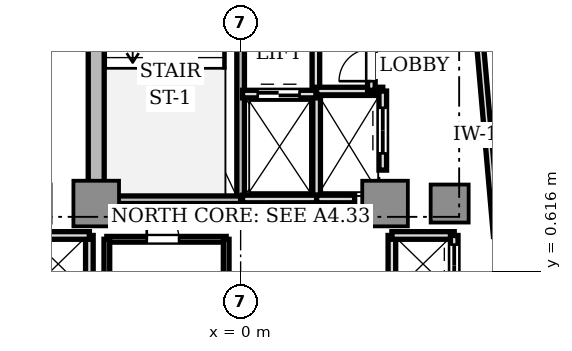
"""IFC4 building model, lengths in metres.
Left out: names, types, materials, properties, quantities, classifications, styles, units other than length and angle.
Written with IfcOpenShell. Run it as: python <this file> out.ifc"""

import sys

from ifc_helpers import new_model, si_unit, direction, frame, frame_2d, origin, origin_2d, place, context, subcontext, project, spatial, rectangle, extrude, source, transform, mapped, element, fill, save


model = new_model("IFC4")
c1 = context("Model", 3, precision=1e-05, world=origin(), true_north=direction((0.0, 1.0)))
c2 = subcontext(c1, "Body", "Model", "MODEL_VIEW")
j1 = project(units=[si_unit("LENGTHUNIT", "METRE"), si_unit("PLANEANGLEUNIT", "RADIAN")], contexts=[c1])
p1 = place(None, origin())
s1 = spatial("IfcSite", under=j1, at=p1, CompositionType="ELEMENT")
p2 = place(p1, origin())
s2 = spatial("IfcBuilding", under=s1, at=p2, CompositionType="ELEMENT")
p3 = place(p2, frame((0.0, 0.0, 191.95)))
s3 = spatial("IfcBuildingStorey", under=s2, at=p3, CompositionType="ELEMENT", Elevation=191.95)
p4 = place(p3, frame((-3.8, 2.85, 0.0), z_axis=(0.0, 0.0, 1.0), x_axis=(0.0, 1.0, 0.0)))
e1 = element("IfcWall", 1, at=p4, inside=s3, PredefinedType="SHEAR", context=c2, shape_type="SweptSolid", body=[
    extrude(rectangle(XDim=6.9, YDim=0.42, at=frame_2d((3.45, 0.0))), origin(), (0.0, 0.0, 1.0), 3.11),
])
m1 = source(origin(), c2, "Body", "SweptSolid", [
    extrude(rectangle(XDim=1.2, YDim=1.2, at=origin_2d()), origin(), (0.0, 0.0, 1.0), 3.11),
])
for number, where, z_axis, x_axis in (
    (2, (-3.8, 2.4, 0.0), (0.0, 0.0, 1.0), (1.0, 0.0, 0.0)),
    (3, (3.8, 2.4, 0.0), (0.0, 0.0, 1.0), (1.0, 0.0, 0.0)),
):
    element("IfcColumn", number, at=place(p3, frame(where, z_axis=z_axis, x_axis=x_axis)), inside=s3, PredefinedType="COLUMN", context=c2, shape_type="MappedRepresentation", body=[
        mapped(m1, transform((0.0, 0.0, 0.0), scale=1.0)),
    ])
m2 = source(origin(), c2, "Body", "SweptSolid", [
    extrude(rectangle(XDim=1.0, YDim=1.0, at=origin_2d()), origin(), (0.0, 0.0, 1.0), 3.11),
])
p5 = place(p3, frame((5.5, 2.4, 0.0), z_axis=(0.0, 0.0, 1.0), x_axis=(1.0, 0.0, 0.0)))
e4 = element("IfcColumn", 4, at=p5, inside=s3, PredefinedType="COLUMN", context=c2, shape_type="MappedRepresentation", body=[
    mapped(m2, transform((0.0, 0.0, 0.0), scale=1.0)),
])
p6 = place(p3, frame((0.0, 2.5, 0.0), z_axis=(0.0, 0.0, 1.0), x_axis=(0.0, 1.0, 0.0)))
e5 = element("IfcWall", 5, at=p6, inside=s3, PredefinedType="SOLIDWALL", context=c2, shape_type="SweptSolid", body=[
    extrude(rectangle(XDim=7.68, YDim=0.2, at=frame_2d((3.84, 0.0))), origin(), (0.0, 0.0, 1.0), 3.11),
])
p7 = place(p6, frame((6.36, 0.0, 0.0)))
e6 = element("IfcOpeningElement", 6, at=p7, cuts=e5, PredefinedType="OPENING", context=c2, shape_type="SweptSolid", body=[
    extrude(rectangle(XDim=1.1, YDim=2.15, at=frame_2d((0.55, 1.075))), frame((0.0, 0.11, 0.0), z_axis=(0.0, -1.0, 0.0), x_axis=(1.0, 0.0, 0.0)), (0.0, 0.0, 1.0), 0.22),
])
p8 = place(p3, frame((-3.72, 2.5, 0.0), z_axis=(0.0, 0.0, 1.0), x_axis=(1.0, 0.0, 0.0)))
e7 = element("IfcWall", 7, at=p8, inside=s3, PredefinedType="SOLIDWALL", context=c2, shape_type="SweptSolid", body=[
    extrude(rectangle(XDim=3.72, YDim=0.2, at=frame_2d((1.86, 0.0))), origin(), (0.0, 0.0, 1.0), 3.11),
])
p9 = place(p3, frame((1.98, 5.32, 0.0), z_axis=(0.0, 0.0, 1.0), x_axis=(0.0, 1.0, 0.0)))
e8 = element("IfcWall", 8, at=p9, inside=s3, PredefinedType="SOLIDWALL", context=c2, shape_type="SweptSolid", body=[
    extrude(rectangle(XDim=4.66, YDim=0.2, at=frame_2d((2.33, 0.0))), origin(), (0.0, 0.0, 1.0), 2.66),
])
p10 = place(p9, frame((3.04, 0.0, 0.0)))
e9 = element("IfcOpeningElement", 9, at=p10, cuts=e8, PredefinedType="OPENING", context=c2, shape_type="SweptSolid", body=[
    extrude(rectangle(XDim=0.85, YDim=2.1, at=frame_2d((0.425, 1.05))), frame((0.0, 0.11, 0.0), z_axis=(0.0, -1.0, 0.0), x_axis=(1.0, 0.0, 0.0)), (0.0, 0.0, 1.0), 0.22),
])
p11 = place(p3, frame((2.0, 2.5, 0.0), z_axis=(0.0, 0.0, 1.0), x_axis=(0.0, 1.0, 0.0)))
e10 = element("IfcWall", 10, at=p11, inside=s3, PredefinedType="SOLIDWALL", context=c2, shape_type="SweptSolid", body=[
    extrude(rectangle(XDim=2.78, YDim=0.2, at=frame_2d((1.39, 0.0))), origin(), (0.0, 0.0, 1.0), 2.66),
])
p12 = place(p3, frame((0.05, 2.52, 0.0), z_axis=(0.0, 0.0, 1.0), x_axis=(1.0, 0.0, 0.0)))
e11 = element("IfcWall", 11, at=p12, inside=s3, PredefinedType="SOLIDWALL", context=c2, shape_type="SweptSolid", body=[
    extrude(rectangle(XDim=1.95, YDim=0.2, at=frame_2d((0.975, 0.0))), origin(), (0.0, 0.0, 1.0), 2.66),
])
p13 = place(p3, frame((0.05, 5.28, 0.0), z_axis=(0.0, 0.0, 1.0), x_axis=(1.0, 0.0, 0.0)))
e12 = element("IfcWall", 12, at=p13, inside=s3, PredefinedType="SOLIDWALL", context=c2, shape_type="SweptSolid", body=[
    extrude(rectangle(XDim=1.93, YDim=0.2, at=frame_2d((0.965, 0.0))), origin(), (0.0, 0.0, 1.0), 2.66),
])
p14 = place(p13, frame((0.4, 0.0, 0.0)))
e13 = element("IfcOpeningElement", 13, at=p14, cuts=e12, PredefinedType="OPENING", context=c2, shape_type="SweptSolid", body=[
    extrude(rectangle(XDim=1.1, YDim=2.2, at=frame_2d((0.55, 1.1))), frame((0.0, 0.11, 0.0), z_axis=(0.0, -1.0, 0.0), x_axis=(1.0, 0.0, 0.0)), (0.0, 0.0, 1.0), 0.22),
])
p15 = place(p3, frame((2.0, 2.52, 0.0), z_axis=(0.0, 0.0, 1.0), x_axis=(1.0, 0.0, 0.0)))
e14 = element("IfcWall", 14, at=p15, inside=s3, PredefinedType="SOLIDWALL", context=c2, shape_type="SweptSolid", body=[
    extrude(rectangle(XDim=1.0, YDim=0.2, at=frame_2d((0.5, 0.0))), origin(), (0.0, 0.0, 1.0), 2.66),
])
p16 = place(p3, frame((2.0, 5.36, 0.0), z_axis=(0.0, 0.0, 1.0), x_axis=(1.0, 0.0, 0.0)))
e15 = element("IfcWall", 15, at=p16, inside=s3, PredefinedType="SOLIDWALL", context=c2, shape_type="SweptSolid", body=[
    extrude(rectangle(XDim=1.74, YDim=0.2, at=frame_2d((0.87, 0.0))), origin(), (0.0, 0.0, 1.0), 2.66),
])
p17 = place(p3, frame((3.74, 3.28, 0.0), z_axis=(0.0, 0.0, 1.0), x_axis=(0.0, 1.0, 0.0)))
e16 = element("IfcWall", 16, at=p17, inside=s3, PredefinedType="SOLIDWALL", context=c2, shape_type="SweptSolid", body=[
    extrude(rectangle(XDim=2.08, YDim=0.2, at=frame_2d((1.04, 0.0))), origin(), (0.0, 0.0, 1.0), 2.66),
])
p18 = place(p17, frame((0.44, 0.0, 0.0)))
e17 = element("IfcOpeningElement", 17, at=p18, cuts=e16, PredefinedType="OPENING", context=c2, shape_type="SweptSolid", body=[
    extrude(rectangle(XDim=1.2, YDim=2.2, at=frame_2d((0.6, 1.1))), frame((0.0, 0.11, 0.0), z_axis=(0.0, -1.0, 0.0), x_axis=(1.0, 0.0, 0.0)), (0.0, 0.0, 1.0), 0.22),
])
p19 = place(p3, frame((3.98, -1.56, 0.0), z_axis=(0.0, 0.0, 1.0), x_axis=(0.0, 1.0, 0.0)))
e18 = element("IfcWall", 18, at=p19, inside=s3, PredefinedType="SOLIDWALL", context=c2, shape_type="SweptSolid", body=[
    extrude(rectangle(XDim=3.12, YDim=0.2, at=frame_2d((1.56, 0.0))), origin(), (0.0, 0.0, 1.0), 2.28),
])
p20 = place(p3, frame((3.98, 1.56, 0.0), z_axis=(0.0, 0.0, 1.0), x_axis=(1.0, 0.0, 0.0)))
e19 = element("IfcWall", 19, at=p20, inside=s3, PredefinedType="SOLIDWALL", context=c2, shape_type="SweptSolid", body=[
    extrude(rectangle(XDim=1.64, YDim=0.2, at=frame_2d((0.82, 0.0))), origin(), (0.0, 0.0, 1.0), 2.66),
])
p21 = place(p3, frame((5.62, 0.0, 0.0), z_axis=(0.0, 0.0, 1.0), x_axis=(0.0, 1.0, 0.0)))
e20 = element("IfcWall", 20, at=p21, inside=s3, PredefinedType="SOLIDWALL", context=c2, shape_type="SweptSolid", body=[
    extrude(rectangle(XDim=1.56, YDim=0.2, at=frame_2d((0.78, 0.0))), origin(), (0.0, 0.0, 1.0), 2.66),
])
p22 = place(p21, frame((0.22, 0.0, 0.0)))
e21 = element("IfcOpeningElement", 21, at=p22, cuts=e20, PredefinedType="OPENING", context=c2, shape_type="SweptSolid", body=[
    extrude(rectangle(XDim=1.1, YDim=2.2, at=frame_2d((0.55, 1.1))), frame((0.0, 0.11, 0.0), z_axis=(0.0, -1.0, 0.0), x_axis=(1.0, 0.0, 0.0)), (0.0, 0.0, 1.0), 0.22),
])
p23 = place(p3, frame((-3.98, -1.56, 0.0), z_axis=(0.0, 0.0, 1.0), x_axis=(0.0, 1.0, 0.0)))
e22 = element("IfcWall", 22, at=p23, inside=s3, PredefinedType="SOLIDWALL", context=c2, shape_type="SweptSolid", body=[
    extrude(rectangle(XDim=3.12, YDim=0.2, at=frame_2d((1.56, 0.0))), origin(), (0.0, 0.0, 1.0), 2.28),
])
p24 = place(p3, frame((-5.62, 1.56, 0.0), z_axis=(0.0, 0.0, 1.0), x_axis=(1.0, 0.0, 0.0)))
e23 = element("IfcWall", 23, at=p24, inside=s3, PredefinedType="SOLIDWALL", context=c2, shape_type="SweptSolid", body=[
    extrude(rectangle(XDim=1.64, YDim=0.2, at=frame_2d((0.82, 0.0))), origin(), (0.0, 0.0, 1.0), 2.66),
])
p25 = place(p3, frame((3.44, 5.38, 0.0), z_axis=(0.0, 0.0, 1.0), x_axis=(0.0, 1.0, 0.0)))
e24 = element("IfcWall", 24, at=p25, inside=s3, PredefinedType="SOLIDWALL", context=c2, shape_type="SweptSolid", body=[
    extrude(rectangle(XDim=2.77, YDim=0.2, at=frame_2d((1.385, 0.0))), origin(), (0.0, 0.0, 1.0), 2.66),
])
p26 = place(p25, frame((0.24, 0.0, 0.0)))
e25 = element("IfcOpeningElement", 25, at=p26, cuts=e24, PredefinedType="OPENING", context=c2, shape_type="SweptSolid", body=[
    extrude(rectangle(XDim=0.85, YDim=2.1, at=frame_2d((0.425, 1.05))), frame((0.0, 0.11, 0.0), z_axis=(0.0, -1.0, 0.0), x_axis=(1.0, 0.0, 0.0)), (0.0, 0.0, 1.0), 0.22),
])
p27 = place(p25, frame((1.62, 0.0, 0.0)))
e26 = element("IfcOpeningElement", 26, at=p27, cuts=e24, PredefinedType="OPENING", context=c2, shape_type="SweptSolid", body=[
    extrude(rectangle(XDim=0.85, YDim=2.1, at=frame_2d((0.425, 1.05))), frame((0.0, 0.11, 0.0), z_axis=(0.0, -1.0, 0.0), x_axis=(1.0, 0.0, 0.0)), (0.0, 0.0, 1.0), 0.22),
])
p28 = place(p3, frame((-3.52, 1.46, 0.0), z_axis=(0.0, 0.0, 1.0), x_axis=(1.0, 0.0, 0.0)))
e27 = element("IfcWall", 27, at=p28, inside=s3, PredefinedType="PARTITIONING", context=c2, shape_type="SweptSolid", body=[
    extrude(rectangle(XDim=3.14, YDim=0.15, at=frame_2d((1.57, 0.0))), origin(), (0.0, 0.0, 1.0), 2.66),
])
p29 = place(p28, frame((1.05, 0.0, 0.0)))
e28 = element("IfcOpeningElement", 28, at=p29, cuts=e27, PredefinedType="OPENING", context=c2, shape_type="SweptSolid", body=[
    extrude(rectangle(XDim=0.85, YDim=2.1, at=frame_2d((0.425, 1.05))), frame((0.0, 0.085, 0.0), z_axis=(0.0, -1.0, 0.0), x_axis=(1.0, 0.0, 0.0)), (0.0, 0.0, 1.0), 0.17),
])
p30 = place(p3, frame((-3.52, 0.1, 0.0), z_axis=(0.0, 0.0, 1.0), x_axis=(0.0, 1.0, 0.0)))
e29 = element("IfcWall", 29, at=p30, inside=s3, PredefinedType="PARTITIONING", context=c2, shape_type="SweptSolid", body=[
    extrude(rectangle(XDim=1.36, YDim=0.15, at=frame_2d((0.68, 0.0))), origin(), (0.0, 0.0, 1.0), 2.28),
])
p31 = place(p3, frame((-0.38, 0.1, 0.0), z_axis=(0.0, 0.0, 1.0), x_axis=(0.0, 1.0, 0.0)))
e30 = element("IfcWall", 30, at=p31, inside=s3, PredefinedType="PARTITIONING", context=c2, shape_type="SweptSolid", body=[
    extrude(rectangle(XDim=1.36, YDim=0.15, at=frame_2d((0.68, 0.0))), origin(), (0.0, 0.0, 1.0), 2.66),
])
p32 = place(p3, frame((6.741, 1.543, 0.0), z_axis=(0.0, 0.0, 1.0), x_axis=(-0.087161289348, 0.996194212812, 0.0)))
e31 = element("IfcWall", 31, at=p32, inside=s3, PredefinedType="PARTITIONING", context=c2, shape_type="SweptSolid", body=[
    extrude(rectangle(XDim=5.35, YDim=0.18, at=frame_2d((2.675, 0.0))), origin(), (0.0, 0.0, 1.0), 2.66),
])
m3 = source(origin(), c2, "Body", "SweptSolid", [
    extrude(rectangle(XDim=1.1, YDim=0.05, at=origin_2d()), origin(), (0.0, 0.0, 1.0), 2.2),
])
p33 = place(p14, frame((0.55, 0.0, 0.0)))
e32 = element("IfcDoor", 32, at=p33, inside=s3, OperationType="DOUBLE_DOOR_SLIDING", PredefinedType="DOOR", context=c2, shape_type="MappedRepresentation", body=[
    mapped(m3, transform((0.0, 0.0, 0.0), scale=1.0)),
])
fill(e13, e32)
m4 = source(origin(), c2, "Body", "SweptSolid", [
    extrude(rectangle(XDim=1.2, YDim=0.05, at=origin_2d()), origin(), (0.0, 0.0, 1.0), 2.2),
])
p34 = place(p18, frame((0.6, 0.0, 0.0)))
e33 = element("IfcDoor", 33, at=p34, inside=s3, OperationType="DOUBLE_DOOR_SLIDING", PredefinedType="DOOR", context=c2, shape_type="MappedRepresentation", body=[
    mapped(m4, transform((0.0, 0.0, 0.0), scale=1.0)),
])
fill(e17, e33)
p35 = place(p22, frame((0.55, 0.0, 0.0)))
e34 = element("IfcDoor", 34, at=p35, inside=s3, OperationType="DOUBLE_DOOR_SLIDING", PredefinedType="DOOR", context=c2, shape_type="MappedRepresentation", body=[
    mapped(m3, transform((0.0, 0.0, 0.0), scale=1.0)),
])
fill(e21, e34)
m5 = source(origin(), c2, "Body", "SweptSolid", [
    extrude(rectangle(XDim=0.85, YDim=0.05, at=origin_2d()), origin(), (0.0, 0.0, 1.0), 2.1),
])
p36 = place(p26, frame((0.425, 0.0, 0.0)))
e35 = element("IfcDoor", 35, at=p36, inside=s3, OperationType="SINGLE_SWING_LEFT", PredefinedType="DOOR", context=c2, shape_type="MappedRepresentation", body=[
    mapped(m5, transform((0.0, 0.0, 0.0), scale=1.0)),
])
fill(e25, e35)
p37 = place(p29, frame((0.425, 0.0, 0.0)))
e36 = element("IfcDoor", 36, at=p37, inside=s3, OperationType="SINGLE_SWING_LEFT", PredefinedType="DOOR", context=c2, shape_type="MappedRepresentation", body=[
    mapped(m5, transform((0.0, 0.0, 0.0), scale=1.0)),
])
fill(e28, e36)
save(model, sys.argv[1])
